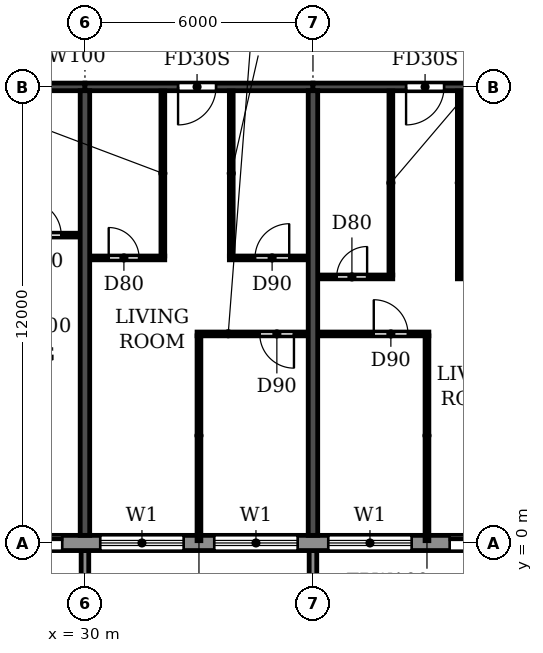
"""IFC4 building model, lengths in metres.
Left out: names, types, materials, properties, quantities, classifications, styles, units other than length and angle.
Written with IfcOpenShell. Run it as: python <this file> out.ifc"""

import sys

from ifc_helpers import new_model, si_unit, direction, frame, frame_2d, origin, place, context, subcontext, project, spatial, polyline, rectangle, outline, extrude, source, transform, mapped, element, fill, save


model = new_model("IFC4")
c1 = context("Model", 3, precision=1e-05, world=origin(), true_north=direction((0.0, 1.0)))
c2 = subcontext(c1, "Body", "Model", "MODEL_VIEW")
j1 = project(units=[si_unit("LENGTHUNIT", "METRE"), si_unit("PLANEANGLEUNIT", "RADIAN")], contexts=[c1])
p1 = place(None, origin())
s1 = spatial("IfcSite", under=j1, at=p1, CompositionType="ELEMENT")
p2 = place(p1, origin())
s2 = spatial("IfcBuilding", under=s1, at=p2, CompositionType="ELEMENT")
p3 = place(p2, frame((0.0, 0.0, 221.4)))
s3 = spatial("IfcBuildingStorey", under=s2, at=p3, CompositionType="ELEMENT", Elevation=221.4)
for number, where, z_axis, x_axis in (
    (1, (30.0, 0.2, 0.0), (0.0, 0.0, 1.0), (0.0, 1.0, 0.0)),
    (2, (36.0, 0.2, 0.0), (0.0, 0.0, 1.0), (0.0, 1.0, 0.0)),
):
    element("IfcWall", number, at=place(p3, frame(where, z_axis=z_axis, x_axis=x_axis)), inside=s3, PredefinedType="SHEAR", context=c2, shape_type="SweptSolid", body=[
        extrude(rectangle(XDim=11.7, YDim=0.25, at=frame_2d((5.85, 0.0))), origin(), (0.0, 0.0, 1.0), 3.08),
    ])
p4 = place(p3, frame((24.0, 12.0, 0.0), z_axis=(0.0, 0.0, 1.0), x_axis=(1.0, 0.0, 0.0)))
e3 = element("IfcWall", 3, at=p4, inside=s3, PredefinedType="SHEAR", context=c2, shape_type="SweptSolid", body=[
    extrude(rectangle(XDim=6.0, YDim=0.2, at=frame_2d((3.0, 0.0))), origin(), (0.0, 0.0, 1.0), 2.48),
])
p5 = place(p4, frame((2.45, 0.0, 0.0)))
e4 = element("IfcOpeningElement", 4, at=p5, cuts=e3, PredefinedType="OPENING", context=c2, shape_type="SweptSolid", body=[
    extrude(rectangle(XDim=1.0, YDim=2.1, at=frame_2d((0.5, 1.05))), frame((0.0, 0.11, 0.0), z_axis=(0.0, -1.0, 0.0), x_axis=(1.0, 0.0, 0.0)), (0.0, 0.0, 1.0), 0.22),
])
p6 = place(p3, frame((30.0, 12.0, 0.0), z_axis=(0.0, 0.0, 1.0), x_axis=(1.0, 0.0, 0.0)))
e5 = element("IfcWall", 5, at=p6, inside=s3, PredefinedType="SHEAR", context=c2, shape_type="SweptSolid", body=[
    extrude(rectangle(XDim=6.0, YDim=0.2, at=frame_2d((3.0, 0.0))), origin(), (0.0, 0.0, 1.0), 2.48),
])
p7 = place(p6, frame((2.45, 0.0, 0.0)))
e6 = element("IfcOpeningElement", 6, at=p7, cuts=e5, PredefinedType="OPENING", context=c2, shape_type="SweptSolid", body=[
    extrude(rectangle(XDim=1.0, YDim=2.1, at=frame_2d((0.5, 1.05))), frame((0.0, 0.11, 0.0), z_axis=(0.0, -1.0, 0.0), x_axis=(1.0, 0.0, 0.0)), (0.0, 0.0, 1.0), 0.22),
])
p8 = place(p3, frame((36.0, 12.0, 0.0), z_axis=(0.0, 0.0, 1.0), x_axis=(1.0, 0.0, 0.0)))
e7 = element("IfcWall", 7, at=p8, inside=s3, PredefinedType="SHEAR", context=c2, shape_type="SweptSolid", body=[
    extrude(rectangle(XDim=6.0, YDim=0.2, at=frame_2d((3.0, 0.0))), origin(), (0.0, 0.0, 1.0), 2.48),
])
p9 = place(p8, frame((2.45, 0.0, 0.0)))
e8 = element("IfcOpeningElement", 8, at=p9, cuts=e7, PredefinedType="OPENING", context=c2, shape_type="SweptSolid", body=[
    extrude(rectangle(XDim=1.0, YDim=2.1, at=frame_2d((0.5, 1.05))), frame((0.0, 0.11, 0.0), z_axis=(0.0, -1.0, 0.0), x_axis=(1.0, 0.0, 0.0)), (0.0, 0.0, 1.0), 0.22),
])
p10 = place(p3, frame((22.683, 0.0, 0.0), z_axis=(0.0, 0.0, 1.0), x_axis=(1.0, 0.0, 0.0)))
e9 = element("IfcWall", 9, at=p10, inside=s3, PredefinedType="STANDARD", context=c2, shape_type="SweptSolid", body=[
    extrude(rectangle(XDim=56.634, YDim=0.4, at=frame_2d((28.317, 0.0))), origin(), (0.0, 0.0, 1.0), 3.08),
])
p11 = place(p10, frame((1.717, 0.0, 0.9)))
e10 = element("IfcOpeningElement", 10, at=p11, cuts=e9, PredefinedType="OPENING", context=c2, shape_type="SweptSolid", body=[
    extrude(rectangle(XDim=2.2, YDim=1.5, at=frame_2d((1.1, 0.75))), frame((0.0, 0.21, 0.0), z_axis=(0.0, -1.0, 0.0), x_axis=(1.0, 0.0, 0.0)), (0.0, 0.0, 1.0), 0.42),
])
p12 = place(p10, frame((4.917, 0.0, 0.0)))
e11 = element("IfcOpeningElement", 11, at=p12, cuts=e9, PredefinedType="OPENING", context=c2, shape_type="SweptSolid", body=[
    extrude(rectangle(XDim=1.8, YDim=2.4, at=frame_2d((0.9, 1.2))), frame((0.0, 0.21, 0.0), z_axis=(0.0, -1.0, 0.0), x_axis=(1.0, 0.0, 0.0)), (0.0, 0.0, 1.0), 0.42),
])
p13 = place(p10, frame((7.717, 0.0, 0.9)))
e12 = element("IfcOpeningElement", 12, at=p13, cuts=e9, PredefinedType="OPENING", context=c2, shape_type="SweptSolid", body=[
    extrude(rectangle(XDim=2.2, YDim=1.5, at=frame_2d((1.1, 0.75))), frame((0.0, 0.21, 0.0), z_axis=(0.0, -1.0, 0.0), x_axis=(1.0, 0.0, 0.0)), (0.0, 0.0, 1.0), 0.42),
])
p14 = place(p10, frame((10.717, 0.0, 0.9)))
e13 = element("IfcOpeningElement", 13, at=p14, cuts=e9, PredefinedType="OPENING", context=c2, shape_type="SweptSolid", body=[
    extrude(rectangle(XDim=2.2, YDim=1.5, at=frame_2d((1.1, 0.75))), frame((0.0, 0.21, 0.0), z_axis=(0.0, -1.0, 0.0), x_axis=(1.0, 0.0, 0.0)), (0.0, 0.0, 1.0), 0.42),
])
p15 = place(p10, frame((13.717, 0.0, 0.9)))
e14 = element("IfcOpeningElement", 14, at=p15, cuts=e9, PredefinedType="OPENING", context=c2, shape_type="SweptSolid", body=[
    extrude(rectangle(XDim=2.2, YDim=1.5, at=frame_2d((1.1, 0.75))), frame((0.0, 0.21, 0.0), z_axis=(0.0, -1.0, 0.0), x_axis=(1.0, 0.0, 0.0)), (0.0, 0.0, 1.0), 0.42),
])
p16 = place(p10, frame((16.917, 0.0, 0.0)))
e15 = element("IfcOpeningElement", 15, at=p16, cuts=e9, PredefinedType="OPENING", context=c2, shape_type="SweptSolid", body=[
    extrude(rectangle(XDim=1.8, YDim=2.4, at=frame_2d((0.9, 1.2))), frame((0.0, 0.21, 0.0), z_axis=(0.0, -1.0, 0.0), x_axis=(1.0, 0.0, 0.0)), (0.0, 0.0, 1.0), 0.42),
])
p17 = place(p10, frame((19.717, 0.0, 0.9)))
e16 = element("IfcOpeningElement", 16, at=p17, cuts=e9, PredefinedType="OPENING", context=c2, shape_type="SweptSolid", body=[
    extrude(rectangle(XDim=2.2, YDim=1.5, at=frame_2d((1.1, 0.75))), frame((0.0, 0.21, 0.0), z_axis=(0.0, -1.0, 0.0), x_axis=(1.0, 0.0, 0.0)), (0.0, 0.0, 1.0), 0.42),
])
p18 = place(p10, frame((22.717, 0.0, 0.9)))
e17 = element("IfcOpeningElement", 17, at=p18, cuts=e9, PredefinedType="OPENING", context=c2, shape_type="SweptSolid", body=[
    extrude(rectangle(XDim=2.2, YDim=1.5, at=frame_2d((1.1, 0.75))), frame((0.0, 0.21, 0.0), z_axis=(0.0, -1.0, 0.0), x_axis=(1.0, 0.0, 0.0)), (0.0, 0.0, 1.0), 0.42),
])
p19 = place(p10, frame((25.917, 0.0, 0.0)))
e18 = element("IfcOpeningElement", 18, at=p19, cuts=e9, PredefinedType="OPENING", context=c2, shape_type="SweptSolid", body=[
    extrude(rectangle(XDim=1.8, YDim=2.4, at=frame_2d((0.9, 1.2))), frame((0.0, 0.21, 0.0), z_axis=(0.0, -1.0, 0.0), x_axis=(1.0, 0.0, 0.0)), (0.0, 0.0, 1.0), 0.42),
])
p20 = place(p10, frame((28.717, 0.0, 0.9)))
e19 = element("IfcOpeningElement", 19, at=p20, cuts=e9, PredefinedType="OPENING", context=c2, shape_type="SweptSolid", body=[
    extrude(rectangle(XDim=2.2, YDim=1.5, at=frame_2d((1.1, 0.75))), frame((0.0, 0.21, 0.0), z_axis=(0.0, -1.0, 0.0), x_axis=(1.0, 0.0, 0.0)), (0.0, 0.0, 1.0), 0.42),
])
p21 = place(p10, frame((31.717, 0.0, 0.9)))
e20 = element("IfcOpeningElement", 20, at=p21, cuts=e9, PredefinedType="OPENING", context=c2, shape_type="SweptSolid", body=[
    extrude(rectangle(XDim=2.2, YDim=1.5, at=frame_2d((1.1, 0.75))), frame((0.0, 0.21, 0.0), z_axis=(0.0, -1.0, 0.0), x_axis=(1.0, 0.0, 0.0)), (0.0, 0.0, 1.0), 0.42),
])
p22 = place(p10, frame((34.717, 0.0, 0.9)))
e21 = element("IfcOpeningElement", 21, at=p22, cuts=e9, PredefinedType="OPENING", context=c2, shape_type="SweptSolid", body=[
    extrude(rectangle(XDim=2.2, YDim=1.5, at=frame_2d((1.1, 0.75))), frame((0.0, 0.21, 0.0), z_axis=(0.0, -1.0, 0.0), x_axis=(1.0, 0.0, 0.0)), (0.0, 0.0, 1.0), 0.42),
])
p23 = place(p10, frame((37.917, 0.0, 0.0)))
e22 = element("IfcOpeningElement", 22, at=p23, cuts=e9, PredefinedType="OPENING", context=c2, shape_type="SweptSolid", body=[
    extrude(rectangle(XDim=1.8, YDim=2.4, at=frame_2d((0.9, 1.2))), frame((0.0, 0.21, 0.0), z_axis=(0.0, -1.0, 0.0), x_axis=(1.0, 0.0, 0.0)), (0.0, 0.0, 1.0), 0.42),
])
p24 = place(p10, frame((40.717, 0.0, 0.9)))
e23 = element("IfcOpeningElement", 23, at=p24, cuts=e9, PredefinedType="OPENING", context=c2, shape_type="SweptSolid", body=[
    extrude(rectangle(XDim=2.2, YDim=1.5, at=frame_2d((1.1, 0.75))), frame((0.0, 0.21, 0.0), z_axis=(0.0, -1.0, 0.0), x_axis=(1.0, 0.0, 0.0)), (0.0, 0.0, 1.0), 0.42),
])
p25 = place(p10, frame((43.717, 0.0, 0.9)))
e24 = element("IfcOpeningElement", 24, at=p25, cuts=e9, PredefinedType="OPENING", context=c2, shape_type="SweptSolid", body=[
    extrude(rectangle(XDim=2.2, YDim=1.5, at=frame_2d((1.1, 0.75))), frame((0.0, 0.21, 0.0), z_axis=(0.0, -1.0, 0.0), x_axis=(1.0, 0.0, 0.0)), (0.0, 0.0, 1.0), 0.42),
])
p26 = place(p10, frame((46.717, 0.0, 0.9)))
e25 = element("IfcOpeningElement", 25, at=p26, cuts=e9, PredefinedType="OPENING", context=c2, shape_type="SweptSolid", body=[
    extrude(rectangle(XDim=2.2, YDim=1.5, at=frame_2d((1.1, 0.75))), frame((0.0, 0.21, 0.0), z_axis=(0.0, -1.0, 0.0), x_axis=(1.0, 0.0, 0.0)), (0.0, 0.0, 1.0), 0.42),
])
p27 = place(p10, frame((49.917, 0.0, 0.0)))
e26 = element("IfcOpeningElement", 26, at=p27, cuts=e9, PredefinedType="OPENING", context=c2, shape_type="SweptSolid", body=[
    extrude(rectangle(XDim=1.8, YDim=2.4, at=frame_2d((0.9, 1.2))), frame((0.0, 0.21, 0.0), z_axis=(0.0, -1.0, 0.0), x_axis=(1.0, 0.0, 0.0)), (0.0, 0.0, 1.0), 0.42),
])
p28 = place(p10, frame((52.717, 0.0, 0.9)))
e27 = element("IfcOpeningElement", 27, at=p28, cuts=e9, PredefinedType="OPENING", context=c2, shape_type="SweptSolid", body=[
    extrude(rectangle(XDim=2.2, YDim=1.5, at=frame_2d((1.1, 0.75))), frame((0.0, 0.21, 0.0), z_axis=(0.0, -1.0, 0.0), x_axis=(1.0, 0.0, 0.0)), (0.0, 0.0, 1.0), 0.42),
])
m1 = source(origin(), c2, "Body", "SweptSolid", [
    extrude(outline(polyline([(0.0, 0.0), (0.2, 0.0), (0.2, 1.65), (0.0, 1.65), (0.0, 0.0)])), origin(), (0.0, 0.0, 1.0), 3.1),
])
for number, where in (
    (28, (29.9, -1.85, 0.0)),
    (29, (35.9, -1.85, 0.0)),
):
    element("IfcWall", number, at=place(p3, frame(where)), inside=s3, PredefinedType="STANDARD", context=c2, shape_type="MappedRepresentation", body=[
        mapped(m1, transform((0.0, 0.0, 0.0))),
    ])
p29 = place(p3, frame((32.95, 5.5, 0.0), z_axis=(0.0, 0.0, 1.0), x_axis=(1.0, 0.0, 0.0)))
e30 = element("IfcWall", 30, at=p29, inside=s3, PredefinedType="PARTITIONING", context=c2, shape_type="SweptSolid", body=[
    extrude(rectangle(XDim=2.915, YDim=0.1, at=frame_2d((1.458, 0.0))), origin(), (0.0, 0.0, 1.0), 3.08),
])
p30 = place(p29, frame((1.65, 0.0, 0.0)))
e31 = element("IfcOpeningElement", 31, at=p30, cuts=e30, PredefinedType="OPENING", context=c2, shape_type="SweptSolid", body=[
    extrude(rectangle(XDim=0.9, YDim=2.1, at=frame_2d((0.45, 1.05))), frame((0.0, 0.06, 0.0), z_axis=(0.0, -1.0, 0.0), x_axis=(1.0, 0.0, 0.0)), (0.0, 0.0, 1.0), 0.12),
])
p31 = place(p3, frame((36.135, 5.5, 0.0), z_axis=(0.0, 0.0, 1.0), x_axis=(1.0, 0.0, 0.0)))
e32 = element("IfcWall", 32, at=p31, inside=s3, PredefinedType="PARTITIONING", context=c2, shape_type="SweptSolid", body=[
    extrude(rectangle(XDim=2.915, YDim=0.1, at=frame_2d((1.458, 0.0))), origin(), (0.0, 0.0, 1.0), 3.08),
])
p32 = place(p31, frame((1.465, 0.0, 0.0)))
e33 = element("IfcOpeningElement", 33, at=p32, cuts=e32, PredefinedType="OPENING", context=c2, shape_type="SweptSolid", body=[
    extrude(rectangle(XDim=0.9, YDim=2.1, at=frame_2d((0.45, 1.05))), frame((0.0, 0.06, 0.0), z_axis=(0.0, -1.0, 0.0), x_axis=(1.0, 0.0, 0.0)), (0.0, 0.0, 1.0), 0.12),
])
p33 = place(p3, frame((36.135, 7.0, 0.0), z_axis=(0.0, 0.0, 1.0), x_axis=(1.0, 0.0, 0.0)))
e34 = element("IfcWall", 34, at=p33, inside=s3, PredefinedType="PARTITIONING", context=c2, shape_type="SweptSolid", body=[
    extrude(rectangle(XDim=1.965, YDim=0.1, at=frame_2d((0.982, 0.0))), origin(), (0.0, 0.0, 1.0), 3.08),
])
p34 = place(p33, frame((0.49, 0.0, 0.0)))
e35 = element("IfcOpeningElement", 35, at=p34, cuts=e34, PredefinedType="OPENING", context=c2, shape_type="SweptSolid", body=[
    extrude(rectangle(XDim=0.8, YDim=2.1, at=frame_2d((0.4, 1.05))), frame((0.0, 0.06, 0.0), z_axis=(0.0, -1.0, 0.0), x_axis=(1.0, 0.0, 0.0)), (0.0, 0.0, 1.0), 0.12),
])
p35 = place(p3, frame((39.8, 7.0, 0.0), z_axis=(0.0, 0.0, 1.0), x_axis=(1.0, 0.0, 0.0)))
e36 = element("IfcWall", 36, at=p35, inside=s3, PredefinedType="PARTITIONING", context=c2, shape_type="SweptSolid", body=[
    extrude(rectangle(XDim=2.065, YDim=0.1, at=frame_2d((1.032, 0.0))), origin(), (0.0, 0.0, 1.0), 3.08),
])
p36 = place(p35, frame((0.675, 0.0, 0.0)))
e37 = element("IfcOpeningElement", 37, at=p36, cuts=e36, PredefinedType="OPENING", context=c2, shape_type="SweptSolid", body=[
    extrude(rectangle(XDim=0.9, YDim=2.1, at=frame_2d((0.45, 1.05))), frame((0.0, 0.06, 0.0), z_axis=(0.0, -1.0, 0.0), x_axis=(1.0, 0.0, 0.0)), (0.0, 0.0, 1.0), 0.12),
])
p37 = place(p3, frame((30.135, 7.5, 0.0), z_axis=(0.0, 0.0, 1.0), x_axis=(1.0, 0.0, 0.0)))
e38 = element("IfcWall", 38, at=p37, inside=s3, PredefinedType="PARTITIONING", context=c2, shape_type="SweptSolid", body=[
    extrude(rectangle(XDim=1.965, YDim=0.1, at=frame_2d((0.982, 0.0))), origin(), (0.0, 0.0, 1.0), 3.08),
])
p38 = place(p37, frame((0.49, 0.0, 0.0)))
e39 = element("IfcOpeningElement", 39, at=p38, cuts=e38, PredefinedType="OPENING", context=c2, shape_type="SweptSolid", body=[
    extrude(rectangle(XDim=0.8, YDim=2.1, at=frame_2d((0.4, 1.05))), frame((0.0, 0.06, 0.0), z_axis=(0.0, -1.0, 0.0), x_axis=(1.0, 0.0, 0.0)), (0.0, 0.0, 1.0), 0.12),
])
p39 = place(p3, frame((33.8, 7.5, 0.0), z_axis=(0.0, 0.0, 1.0), x_axis=(1.0, 0.0, 0.0)))
e40 = element("IfcWall", 40, at=p39, inside=s3, PredefinedType="PARTITIONING", context=c2, shape_type="SweptSolid", body=[
    extrude(rectangle(XDim=2.065, YDim=0.1, at=frame_2d((1.032, 0.0))), origin(), (0.0, 0.0, 1.0), 3.08),
])
p40 = place(p39, frame((0.675, 0.0, 0.0)))
e41 = element("IfcOpeningElement", 41, at=p40, cuts=e40, PredefinedType="OPENING", context=c2, shape_type="SweptSolid", body=[
    extrude(rectangle(XDim=0.9, YDim=2.1, at=frame_2d((0.45, 1.05))), frame((0.0, 0.06, 0.0), z_axis=(0.0, -1.0, 0.0), x_axis=(1.0, 0.0, 0.0)), (0.0, 0.0, 1.0), 0.12),
])
p41 = place(p3, frame((27.8, 8.1, 0.0), z_axis=(0.0, 0.0, 1.0), x_axis=(1.0, 0.0, 0.0)))
e42 = element("IfcWall", 42, at=p41, inside=s3, PredefinedType="PARTITIONING", context=c2, shape_type="SweptSolid", body=[
    extrude(rectangle(XDim=2.065, YDim=0.1, at=frame_2d((1.032, 0.0))), origin(), (0.0, 0.0, 1.0), 3.08),
])
p42 = place(p41, frame((0.675, 0.0, 0.0)))
e43 = element("IfcOpeningElement", 43, at=p42, cuts=e42, PredefinedType="OPENING", context=c2, shape_type="SweptSolid", body=[
    extrude(rectangle(XDim=0.9, YDim=2.1, at=frame_2d((0.45, 1.05))), frame((0.0, 0.06, 0.0), z_axis=(0.0, -1.0, 0.0), x_axis=(1.0, 0.0, 0.0)), (0.0, 0.0, 1.0), 0.12),
])
p43 = place(p3, frame((32.05, 7.55, 0.0), z_axis=(0.0, 0.0, 1.0), x_axis=(0.0, 1.0, 0.0)))
e44 = element("IfcWall", 44, at=p43, inside=s3, PredefinedType="PARTITIONING", context=c2, shape_type="SweptSolid", body=[
    extrude(rectangle(XDim=4.34, YDim=0.1, at=frame_2d((2.17, 0.0))), origin(), (0.0, 0.0, 1.0), 3.08),
])
p44 = place(p3, frame((33.0, 0.06, 0.0), z_axis=(0.0, 0.0, 1.0), x_axis=(0.0, 1.0, 0.0)))
e45 = element("IfcWall", 45, at=p44, inside=s3, PredefinedType="PARTITIONING", context=c2, shape_type="SweptSolid", body=[
    extrude(rectangle(XDim=5.39, YDim=0.1, at=frame_2d((2.695, 0.0))), origin(), (0.0, 0.0, 1.0), 3.08),
])
p45 = place(p3, frame((33.85, 7.55, 0.0), z_axis=(0.0, 0.0, 1.0), x_axis=(0.0, 1.0, 0.0)))
e46 = element("IfcWall", 46, at=p45, inside=s3, PredefinedType="PARTITIONING", context=c2, shape_type="SweptSolid", body=[
    extrude(rectangle(XDim=4.34, YDim=0.1, at=frame_2d((2.17, 0.0))), origin(), (0.0, 0.0, 1.0), 3.08),
])
p46 = place(p3, frame((38.05, 7.05, 0.0), z_axis=(0.0, 0.0, 1.0), x_axis=(0.0, 1.0, 0.0)))
e47 = element("IfcWall", 47, at=p46, inside=s3, PredefinedType="PARTITIONING", context=c2, shape_type="SweptSolid", body=[
    extrude(rectangle(XDim=4.84, YDim=0.1, at=frame_2d((2.42, 0.0))), origin(), (0.0, 0.0, 1.0), 3.08),
])
p47 = place(p3, frame((39.0, 0.06, 0.0), z_axis=(0.0, 0.0, 1.0), x_axis=(0.0, 1.0, 0.0)))
e48 = element("IfcWall", 48, at=p47, inside=s3, PredefinedType="PARTITIONING", context=c2, shape_type="SweptSolid", body=[
    extrude(rectangle(XDim=5.39, YDim=0.1, at=frame_2d((2.695, 0.0))), origin(), (0.0, 0.0, 1.0), 3.08),
])
p48 = place(p3, frame((39.85, 7.05, 0.0), z_axis=(0.0, 0.0, 1.0), x_axis=(0.0, 1.0, 0.0)))
e49 = element("IfcWall", 49, at=p48, inside=s3, PredefinedType="PARTITIONING", context=c2, shape_type="SweptSolid", body=[
    extrude(rectangle(XDim=4.84, YDim=0.1, at=frame_2d((2.42, 0.0))), origin(), (0.0, 0.0, 1.0), 3.08),
])
p49 = place(p12, origin())
e50 = element("IfcDoor", 50, at=p49, inside=s3, OperationType="DOUBLE_DOOR_SLIDING", PredefinedType="DOOR", context=c2, shape_type="SweptSolid", body=[
    extrude(rectangle(XDim=1.8, YDim=2.4, at=frame_2d((0.9, 1.2))), frame((0.0, 0.025, 0.0), z_axis=(0.0, -1.0, 0.0), x_axis=(1.0, 0.0, 0.0)), (0.0, 0.0, 1.0), 0.05),
])
fill(e11, e50)
p50 = place(p13, origin())
e51 = element("IfcWindow", 51, at=p50, inside=s3, PartitioningType="DOUBLE_PANEL_HORIZONTAL", PredefinedType="WINDOW", context=c2, shape_type="SweptSolid", body=[
    extrude(rectangle(XDim=2.2, YDim=1.5, at=frame_2d((1.1, 0.75))), frame((0.0, 0.03, 0.0), z_axis=(0.0, -1.0, 0.0), x_axis=(1.0, 0.0, 0.0)), (0.0, 0.0, 1.0), 0.06),
])
fill(e12, e51)
p51 = place(p14, origin())
e52 = element("IfcWindow", 52, at=p51, inside=s3, PartitioningType="DOUBLE_PANEL_HORIZONTAL", PredefinedType="WINDOW", context=c2, shape_type="SweptSolid", body=[
    extrude(rectangle(XDim=2.2, YDim=1.5, at=frame_2d((1.1, 0.75))), frame((0.0, 0.03, 0.0), z_axis=(0.0, -1.0, 0.0), x_axis=(1.0, 0.0, 0.0)), (0.0, 0.0, 1.0), 0.06),
])
fill(e13, e52)
p52 = place(p15, origin())
e53 = element("IfcWindow", 53, at=p52, inside=s3, PartitioningType="DOUBLE_PANEL_HORIZONTAL", PredefinedType="WINDOW", context=c2, shape_type="SweptSolid", body=[
    extrude(rectangle(XDim=2.2, YDim=1.5, at=frame_2d((1.1, 0.75))), frame((0.0, 0.03, 0.0), z_axis=(0.0, -1.0, 0.0), x_axis=(1.0, 0.0, 0.0)), (0.0, 0.0, 1.0), 0.06),
])
fill(e14, e53)
p53 = place(p16, origin())
e54 = element("IfcDoor", 54, at=p53, inside=s3, OperationType="DOUBLE_DOOR_SLIDING", PredefinedType="DOOR", context=c2, shape_type="SweptSolid", body=[
    extrude(rectangle(XDim=1.8, YDim=2.4, at=frame_2d((0.9, 1.2))), frame((0.0, 0.025, 0.0), z_axis=(0.0, -1.0, 0.0), x_axis=(1.0, 0.0, 0.0)), (0.0, 0.0, 1.0), 0.05),
])
fill(e15, e54)
p54 = place(p42, origin())
e55 = element("IfcDoor", 55, at=p54, inside=s3, OperationType="SINGLE_SWING_LEFT", PredefinedType="DOOR", context=c2, shape_type="SweptSolid", body=[
    extrude(rectangle(XDim=0.9, YDim=2.1, at=frame_2d((0.45, 1.05))), frame((0.0, 0.025, 0.0), z_axis=(0.0, -1.0, 0.0), x_axis=(1.0, 0.0, 0.0)), (0.0, 0.0, 1.0), 0.05),
])
fill(e43, e55)
p55 = place(p38, origin())
e56 = element("IfcDoor", 56, at=p55, inside=s3, OperationType="SINGLE_SWING_LEFT", PredefinedType="DOOR", context=c2, shape_type="SweptSolid", body=[
    extrude(rectangle(XDim=0.8, YDim=2.1, at=frame_2d((0.4, 1.05))), frame((0.0, 0.025, 0.0), z_axis=(0.0, -1.0, 0.0), x_axis=(1.0, 0.0, 0.0)), (0.0, 0.0, 1.0), 0.05),
])
fill(e39, e56)
p56 = place(p7, frame((1.0, 0.0, 0.0), z_axis=(0.0, 0.0, 1.0), x_axis=(-1.0, 0.0, 0.0)))
e57 = element("IfcDoor", 57, at=p56, inside=s3, OperationType="SINGLE_SWING_RIGHT", PredefinedType="DOOR", context=c2, shape_type="SweptSolid", body=[
    extrude(rectangle(XDim=1.0, YDim=2.1, at=frame_2d((0.5, 1.05))), frame((0.0, 0.025, 0.0), z_axis=(0.0, -1.0, 0.0), x_axis=(1.0, 0.0, 0.0)), (0.0, 0.0, 1.0), 0.05),
])
fill(e6, e57)
p57 = place(p40, origin())
e58 = element("IfcDoor", 58, at=p57, inside=s3, OperationType="SINGLE_SWING_RIGHT", PredefinedType="DOOR", context=c2, shape_type="SweptSolid", body=[
    extrude(rectangle(XDim=0.9, YDim=2.1, at=frame_2d((0.45, 1.05))), frame((0.0, 0.025, 0.0), z_axis=(0.0, -1.0, 0.0), x_axis=(1.0, 0.0, 0.0)), (0.0, 0.0, 1.0), 0.05),
])
fill(e41, e58)
p58 = place(p30, frame((0.9, 0.0, 0.0), z_axis=(0.0, 0.0, 1.0), x_axis=(-1.0, 0.0, 0.0)))
e59 = element("IfcDoor", 59, at=p58, inside=s3, OperationType="SINGLE_SWING_LEFT", PredefinedType="DOOR", context=c2, shape_type="SweptSolid", body=[
    extrude(rectangle(XDim=0.9, YDim=2.1, at=frame_2d((0.45, 1.05))), frame((0.0, 0.025, 0.0), z_axis=(0.0, -1.0, 0.0), x_axis=(1.0, 0.0, 0.0)), (0.0, 0.0, 1.0), 0.05),
])
fill(e31, e59)
p59 = place(p34, origin())
e60 = element("IfcDoor", 60, at=p59, inside=s3, OperationType="SINGLE_SWING_RIGHT", PredefinedType="DOOR", context=c2, shape_type="SweptSolid", body=[
    extrude(rectangle(XDim=0.8, YDim=2.1, at=frame_2d((0.4, 1.05))), frame((0.0, 0.025, 0.0), z_axis=(0.0, -1.0, 0.0), x_axis=(1.0, 0.0, 0.0)), (0.0, 0.0, 1.0), 0.05),
])
fill(e35, e60)
p60 = place(p32, origin())
e61 = element("IfcDoor", 61, at=p60, inside=s3, OperationType="SINGLE_SWING_LEFT", PredefinedType="DOOR", context=c2, shape_type="SweptSolid", body=[
    extrude(rectangle(XDim=0.9, YDim=2.1, at=frame_2d((0.45, 1.05))), frame((0.0, 0.025, 0.0), z_axis=(0.0, -1.0, 0.0), x_axis=(1.0, 0.0, 0.0)), (0.0, 0.0, 1.0), 0.05),
])
fill(e33, e61)
p61 = place(p9, frame((1.0, 0.0, 0.0), z_axis=(0.0, 0.0, 1.0), x_axis=(-1.0, 0.0, 0.0)))
e62 = element("IfcDoor", 62, at=p61, inside=s3, OperationType="SINGLE_SWING_RIGHT", PredefinedType="DOOR", context=c2, shape_type="SweptSolid", body=[
    extrude(rectangle(XDim=1.0, YDim=2.1, at=frame_2d((0.5, 1.05))), frame((0.0, 0.025, 0.0), z_axis=(0.0, -1.0, 0.0), x_axis=(1.0, 0.0, 0.0)), (0.0, 0.0, 1.0), 0.05),
])
fill(e8, e62)
save(model, sys.argv[1])
